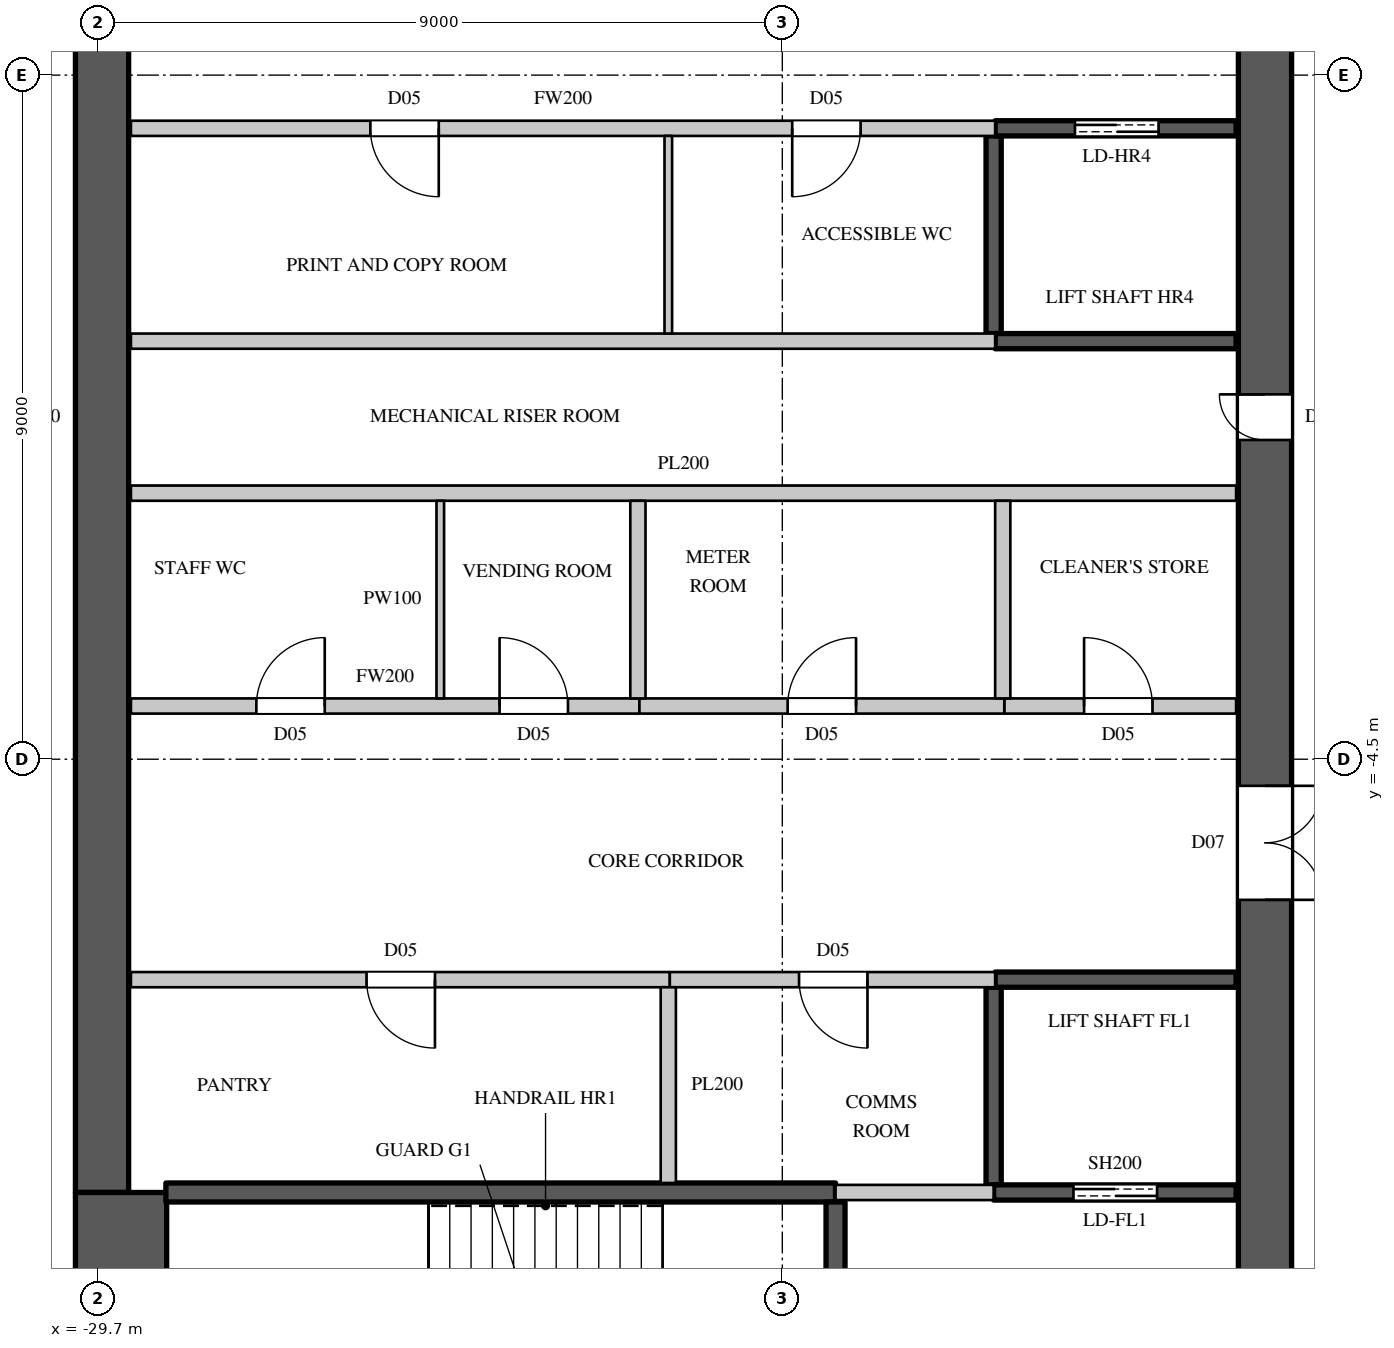
"""IFC4 building model, lengths in metres.
Left out: names, types, materials, properties, quantities, classifications, styles, units other than length and angle.
Written with IfcOpenShell. Run it as: python <this file> out.ifc"""

import sys

from ifc_helpers import new_model, si_unit, direction, frame, frame_2d, origin, place, context, subcontext, project, spatial, rectangle, extrude, element, fill, save


model = new_model("IFC4")
c1 = context("Model", 3, precision=1e-05, world=origin(), true_north=direction((0.0, 1.0)))
c2 = subcontext(c1, "Body", "Model", "MODEL_VIEW")
j1 = project(units=[si_unit("LENGTHUNIT", "METRE"), si_unit("PLANEANGLEUNIT", "RADIAN")], contexts=[c1])
p1 = place(None, origin())
s1 = spatial("IfcSite", under=j1, at=p1, CompositionType="ELEMENT")
p2 = place(p1, origin())
s2 = spatial("IfcBuilding", under=s1, at=p2, CompositionType="ELEMENT")
p3 = place(p2, frame((0.0, 0.0, 321.3)))
s3 = spatial("IfcBuildingStorey", under=s2, at=p3, CompositionType="ELEMENT", Elevation=321.3)
p4 = place(p3, frame((-14.35, -14.8, 0.0), z_axis=(0.0, 0.0, 1.0), x_axis=(0.0, 1.0, 0.0)))
e1 = element("IfcWall", 1, at=p4, inside=s3, PredefinedType="SHEAR", context=c2, shape_type="SweptSolid", body=[
    extrude(rectangle(XDim=29.6, YDim=0.7, at=frame_2d((14.8, 0.0))), origin(), (0.0, 0.0, 1.0), 4.1),
])
p5 = place(p4, frame((1.55, 0.0, 0.0)))
e2 = element("IfcOpeningElement", 2, at=p5, cuts=e1, PredefinedType="OPENING", context=c2, shape_type="SweptSolid", body=[
    extrude(rectangle(XDim=1.5, YDim=2.4, at=frame_2d((0.75, 1.2))), frame((0.0, 0.36, 0.0), z_axis=(0.0, -1.0, 0.0), x_axis=(1.0, 0.0, 0.0)), (0.0, 0.0, 1.0), 0.72),
])
p6 = place(p4, frame((26.55, 0.0, 0.0)))
e3 = element("IfcOpeningElement", 3, at=p6, cuts=e1, PredefinedType="OPENING", context=c2, shape_type="SweptSolid", body=[
    extrude(rectangle(XDim=1.5, YDim=2.4, at=frame_2d((0.75, 1.2))), frame((0.0, 0.36, 0.0), z_axis=(0.0, -1.0, 0.0), x_axis=(1.0, 0.0, 0.0)), (0.0, 0.0, 1.0), 0.72),
])
p7 = place(p4, frame((8.45, 0.0, 0.0)))
e4 = element("IfcOpeningElement", 4, at=p7, cuts=e1, PredefinedType="OPENING", context=c2, shape_type="SweptSolid", body=[
    extrude(rectangle(XDim=1.5, YDim=2.4, at=frame_2d((0.75, 1.2))), frame((0.0, 0.36, 0.0), z_axis=(0.0, -1.0, 0.0), x_axis=(1.0, 0.0, 0.0)), (0.0, 0.0, 1.0), 0.72),
])
p8 = place(p4, frame((19.65, 0.0, 0.0)))
e5 = element("IfcOpeningElement", 5, at=p8, cuts=e1, PredefinedType="OPENING", context=c2, shape_type="SweptSolid", body=[
    extrude(rectangle(XDim=1.5, YDim=2.4, at=frame_2d((0.75, 1.2))), frame((0.0, 0.36, 0.0), z_axis=(0.0, -1.0, 0.0), x_axis=(1.0, 0.0, 0.0)), (0.0, 0.0, 1.0), 0.72),
])
p9 = place(p4, frame((14.5, 0.0, 0.0)))
e6 = element("IfcOpeningElement", 6, at=p9, cuts=e1, PredefinedType="OPENING", context=c2, shape_type="SweptSolid", body=[
    extrude(rectangle(XDim=0.6, YDim=2.0, at=frame_2d((0.3, 1.0))), frame((0.0, 0.36, 0.0), z_axis=(0.0, -1.0, 0.0), x_axis=(1.0, 0.0, 0.0)), (0.0, 0.0, 1.0), 0.72),
])
p10 = place(p3, frame((-29.65, -10.2, 0.0), z_axis=(0.0, 0.0, 1.0), x_axis=(0.0, 1.0, 0.0)))
e7 = element("IfcWall", 7, at=p10, inside=s3, PredefinedType="SHEAR", context=c2, shape_type="SweptSolid", body=[
    extrude(rectangle(XDim=20.4, YDim=0.7, at=frame_2d((10.2, 0.0))), origin(), (0.0, 0.0, 1.0), 4.1),
])
p11 = place(p3, frame((-29.4, -14.8, 0.0), z_axis=(0.0, 0.0, 1.0), x_axis=(0.0, 1.0, 0.0)))
e8 = element("IfcWall", 8, at=p11, inside=s3, PredefinedType="SHEAR", context=c2, shape_type="SweptSolid", body=[
    extrude(rectangle(XDim=4.6, YDim=1.2, at=frame_2d((2.3, 0.0))), origin(), (0.0, 0.0, 1.0), 4.1),
])
p12 = place(p3, frame((-29.27, -7.4, 0.0), z_axis=(0.0, 0.0, 1.0), x_axis=(1.0, 0.0, 0.0)))
e9 = element("IfcWall", 9, at=p12, inside=s3, PredefinedType="PARTITIONING", context=c2, shape_type="SweptSolid", body=[
    extrude(rectangle(XDim=7.09, YDim=0.2, at=frame_2d((3.545, 0.0))), origin(), (0.0, 0.0, 1.0), 3.8),
])
p13 = place(p12, frame((3.1, 0.0, 0.0)))
e10 = element("IfcOpeningElement", 10, at=p13, cuts=e9, PredefinedType="OPENING", context=c2, shape_type="SweptSolid", body=[
    extrude(rectangle(XDim=0.9, YDim=2.2, at=frame_2d((0.45, 1.1))), frame((0.0, 0.11, 0.0), z_axis=(0.0, -1.0, 0.0), x_axis=(1.0, 0.0, 0.0)), (0.0, 0.0, 1.0), 0.22),
])
p14 = place(p3, frame((-29.27, -3.8, 0.0), z_axis=(0.0, 0.0, 1.0), x_axis=(1.0, 0.0, 0.0)))
e11 = element("IfcWall", 11, at=p14, inside=s3, PredefinedType="PARTITIONING", context=c2, shape_type="SweptSolid", body=[
    extrude(rectangle(XDim=6.69, YDim=0.2, at=frame_2d((3.345, 0.0))), origin(), (0.0, 0.0, 1.0), 3.8),
])
p15 = place(p14, frame((1.65, 0.0, 0.0)))
e12 = element("IfcOpeningElement", 12, at=p15, cuts=e11, PredefinedType="OPENING", context=c2, shape_type="SweptSolid", body=[
    extrude(rectangle(XDim=0.9, YDim=2.2, at=frame_2d((0.45, 1.1))), frame((0.0, 0.11, 0.0), z_axis=(0.0, -1.0, 0.0), x_axis=(1.0, 0.0, 0.0)), (0.0, 0.0, 1.0), 0.22),
])
p16 = place(p14, frame((4.85, 0.0, 0.0)))
e13 = element("IfcOpeningElement", 13, at=p16, cuts=e11, PredefinedType="OPENING", context=c2, shape_type="SweptSolid", body=[
    extrude(rectangle(XDim=0.9, YDim=2.2, at=frame_2d((0.45, 1.1))), frame((0.0, 0.11, 0.0), z_axis=(0.0, -1.0, 0.0), x_axis=(1.0, 0.0, 0.0)), (0.0, 0.0, 1.0), 0.22),
])
p17 = place(p3, frame((-29.27, 3.8, 0.0), z_axis=(0.0, 0.0, 1.0), x_axis=(1.0, 0.0, 0.0)))
e14 = element("IfcWall", 14, at=p17, inside=s3, PredefinedType="PARTITIONING", context=c2, shape_type="SweptSolid", body=[
    extrude(rectangle(XDim=11.37, YDim=0.2, at=frame_2d((5.685, 0.0))), origin(), (0.0, 0.0, 1.0), 3.8),
])
p18 = place(p17, frame((3.15, 0.0, 0.0)))
e15 = element("IfcOpeningElement", 15, at=p18, cuts=e14, PredefinedType="OPENING", context=c2, shape_type="SweptSolid", body=[
    extrude(rectangle(XDim=0.9, YDim=2.2, at=frame_2d((0.45, 1.1))), frame((0.0, 0.11, 0.0), z_axis=(0.0, -1.0, 0.0), x_axis=(1.0, 0.0, 0.0)), (0.0, 0.0, 1.0), 0.22),
])
p19 = place(p17, frame((8.7, 0.0, 0.0)))
e16 = element("IfcOpeningElement", 16, at=p19, cuts=e14, PredefinedType="OPENING", context=c2, shape_type="SweptSolid", body=[
    extrude(rectangle(XDim=0.9, YDim=2.2, at=frame_2d((0.45, 1.1))), frame((0.0, 0.11, 0.0), z_axis=(0.0, -1.0, 0.0), x_axis=(1.0, 0.0, 0.0)), (0.0, 0.0, 1.0), 0.22),
])
p20 = place(p3, frame((-17.78, -3.8, 0.0), z_axis=(0.0, 0.0, 1.0), x_axis=(1.0, 0.0, 0.0)))
e17 = element("IfcWall", 17, at=p20, inside=s3, PredefinedType="PARTITIONING", context=c2, shape_type="SweptSolid", body=[
    extrude(rectangle(XDim=3.05, YDim=0.2, at=frame_2d((1.525, 0.0))), origin(), (0.0, 0.0, 1.0), 3.8),
])
p21 = place(p20, frame((1.05, 0.0, 0.0)))
e18 = element("IfcOpeningElement", 18, at=p21, cuts=e17, PredefinedType="OPENING", context=c2, shape_type="SweptSolid", body=[
    extrude(rectangle(XDim=0.9, YDim=2.2, at=frame_2d((0.45, 1.1))), frame((0.0, 0.11, 0.0), z_axis=(0.0, -1.0, 0.0), x_axis=(1.0, 0.0, 0.0)), (0.0, 0.0, 1.0), 0.22),
])
p22 = place(p3, frame((-29.27, -1.0, 0.0), z_axis=(0.0, 0.0, 1.0), x_axis=(1.0, 0.0, 0.0)))
e19 = element("IfcWall", 19, at=p22, inside=s3, PredefinedType="PARTITIONING", context=c2, shape_type="SweptSolid", body=[
    extrude(rectangle(XDim=14.54, YDim=0.2, at=frame_2d((7.27, 0.0))), origin(), (0.0, 0.0, 1.0), 3.8),
])
p23 = place(p3, frame((-29.27, 1.0, 0.0), z_axis=(0.0, 0.0, 1.0), x_axis=(1.0, 0.0, 0.0)))
e20 = element("IfcWall", 20, at=p23, inside=s3, PredefinedType="PARTITIONING", context=c2, shape_type="SweptSolid", body=[
    extrude(rectangle(XDim=11.37, YDim=0.2, at=frame_2d((5.685, 0.0))), origin(), (0.0, 0.0, 1.0), 3.8),
])
p24 = place(p3, frame((-22.58, -3.8, 0.0), z_axis=(0.0, 0.0, 1.0), x_axis=(1.0, 0.0, 0.0)))
e21 = element("IfcWall", 21, at=p24, inside=s3, PredefinedType="PARTITIONING", context=c2, shape_type="SweptSolid", body=[
    extrude(rectangle(XDim=4.8, YDim=0.2, at=frame_2d((2.4, 0.0))), origin(), (0.0, 0.0, 1.0), 3.8),
])
p25 = place(p24, frame((1.95, 0.0, 0.0)))
e22 = element("IfcOpeningElement", 22, at=p25, cuts=e21, PredefinedType="OPENING", context=c2, shape_type="SweptSolid", body=[
    extrude(rectangle(XDim=0.9, YDim=2.2, at=frame_2d((0.45, 1.1))), frame((0.0, 0.11, 0.0), z_axis=(0.0, -1.0, 0.0), x_axis=(1.0, 0.0, 0.0)), (0.0, 0.0, 1.0), 0.22),
])
p26 = place(p3, frame((-22.6, -3.7, 0.0), z_axis=(0.0, 0.0, 1.0), x_axis=(0.0, 1.0, 0.0)))
e23 = element("IfcWall", 23, at=p26, inside=s3, PredefinedType="PARTITIONING", context=c2, shape_type="SweptSolid", body=[
    extrude(rectangle(XDim=2.6, YDim=0.2, at=frame_2d((1.3, 0.0))), origin(), (0.0, 0.0, 1.0), 3.8),
])
p27 = place(p3, frame((-22.18, -7.4, 0.0), z_axis=(0.0, 0.0, 1.0), x_axis=(1.0, 0.0, 0.0)))
e24 = element("IfcWall", 24, at=p27, inside=s3, PredefinedType="PARTITIONING", context=c2, shape_type="SweptSolid", body=[
    extrude(rectangle(XDim=4.28, YDim=0.2, at=frame_2d((2.14, 0.0))), origin(), (0.0, 0.0, 1.0), 3.8),
])
p28 = place(p27, frame((1.7, 0.0, 0.0)))
e25 = element("IfcOpeningElement", 25, at=p28, cuts=e24, PredefinedType="OPENING", context=c2, shape_type="SweptSolid", body=[
    extrude(rectangle(XDim=0.9, YDim=2.2, at=frame_2d((0.45, 1.1))), frame((0.0, 0.11, 0.0), z_axis=(0.0, -1.0, 0.0), x_axis=(1.0, 0.0, 0.0)), (0.0, 0.0, 1.0), 0.22),
])
p29 = place(p3, frame((-22.2, -10.075, 0.0), z_axis=(0.0, 0.0, 1.0), x_axis=(0.0, 1.0, 0.0)))
e26 = element("IfcWall", 26, at=p29, inside=s3, PredefinedType="PARTITIONING", context=c2, shape_type="SweptSolid", body=[
    extrude(rectangle(XDim=2.575, YDim=0.2, at=frame_2d((1.288, 0.0))), origin(), (0.0, 0.0, 1.0), 3.8),
])
p30 = place(p3, frame((-20.0, -10.2, 0.0), z_axis=(0.0, 0.0, 1.0), x_axis=(1.0, 0.0, 0.0)))
e27 = element("IfcWall", 27, at=p30, inside=s3, PredefinedType="PARTITIONING", context=c2, shape_type="SweptSolid", body=[
    extrude(rectangle(XDim=2.08, YDim=0.2, at=frame_2d((1.04, 0.0))), origin(), (0.0, 0.0, 1.0), 3.8),
])
p31 = place(p3, frame((-17.8, -3.7, 0.0), z_axis=(0.0, 0.0, 1.0), x_axis=(0.0, 1.0, 0.0)))
e28 = element("IfcWall", 28, at=p31, inside=s3, PredefinedType="PARTITIONING", context=c2, shape_type="SweptSolid", body=[
    extrude(rectangle(XDim=2.6, YDim=0.2, at=frame_2d((1.3, 0.0))), origin(), (0.0, 0.0, 1.0), 3.8),
])
p32 = place(p3, frame((-17.92, -10.1, 0.0), z_axis=(0.0, 0.0, 1.0), x_axis=(0.0, 1.0, 0.0)))
e29 = element("IfcWall", 29, at=p32, inside=s3, PredefinedType="SHEAR", context=c2, shape_type="SweptSolid", body=[
    extrude(rectangle(XDim=2.6, YDim=0.2, at=frame_2d((1.3, 0.0))), origin(), (0.0, 0.0, 1.0), 3.8),
])
p33 = place(p3, frame((-17.92, -10.2, 0.0), z_axis=(0.0, 0.0, 1.0), x_axis=(1.0, 0.0, 0.0)))
e30 = element("IfcWall", 30, at=p33, inside=s3, PredefinedType="SHEAR", context=c2, shape_type="SweptSolid", body=[
    extrude(rectangle(XDim=3.19, YDim=0.2, at=frame_2d((1.595, 0.0))), origin(), (0.0, 0.0, 1.0), 3.8),
])
p34 = place(p33, frame((1.05, 0.0, 0.0)))
e31 = element("IfcOpeningElement", 31, at=p34, cuts=e30, PredefinedType="OPENING", context=c2, shape_type="SweptSolid", body=[
    extrude(rectangle(XDim=1.1, YDim=2.2, at=frame_2d((0.55, 1.1))), frame((0.0, 0.11, 0.0), z_axis=(0.0, -1.0, 0.0), x_axis=(1.0, 0.0, 0.0)), (0.0, 0.0, 1.0), 0.22),
])
p35 = place(p3, frame((-17.9, -7.4, 0.0), z_axis=(0.0, 0.0, 1.0), x_axis=(1.0, 0.0, 0.0)))
e32 = element("IfcWall", 32, at=p35, inside=s3, PredefinedType="SHEAR", context=c2, shape_type="SweptSolid", body=[
    extrude(rectangle(XDim=3.17, YDim=0.2, at=frame_2d((1.585, 0.0))), origin(), (0.0, 0.0, 1.0), 3.8),
])
p36 = place(p3, frame((-17.92, 1.1, 0.0), z_axis=(0.0, 0.0, 1.0), x_axis=(0.0, 1.0, 0.0)))
e33 = element("IfcWall", 33, at=p36, inside=s3, PredefinedType="SHEAR", context=c2, shape_type="SweptSolid", body=[
    extrude(rectangle(XDim=2.6, YDim=0.2, at=frame_2d((1.3, 0.0))), origin(), (0.0, 0.0, 1.0), 3.8),
])
p37 = place(p3, frame((-17.9, 1.0, 0.0), z_axis=(0.0, 0.0, 1.0), x_axis=(1.0, 0.0, 0.0)))
e34 = element("IfcWall", 34, at=p37, inside=s3, PredefinedType="SHEAR", context=c2, shape_type="SweptSolid", body=[
    extrude(rectangle(XDim=3.17, YDim=0.2, at=frame_2d((1.585, 0.0))), origin(), (0.0, 0.0, 1.0), 3.8),
])
p38 = place(p3, frame((-17.9, 3.8, 0.0), z_axis=(0.0, 0.0, 1.0), x_axis=(1.0, 0.0, 0.0)))
e35 = element("IfcWall", 35, at=p38, inside=s3, PredefinedType="SHEAR", context=c2, shape_type="SweptSolid", body=[
    extrude(rectangle(XDim=3.17, YDim=0.2, at=frame_2d((1.585, 0.0))), origin(), (0.0, 0.0, 1.0), 3.8),
])
p39 = place(p38, frame((1.05, 0.0, 0.0)))
e36 = element("IfcOpeningElement", 36, at=p39, cuts=e35, PredefinedType="OPENING", context=c2, shape_type="SweptSolid", body=[
    extrude(rectangle(XDim=1.1, YDim=2.2, at=frame_2d((0.55, 1.1))), frame((0.0, 0.11, 0.0), z_axis=(0.0, -1.0, 0.0), x_axis=(1.0, 0.0, 0.0)), (0.0, 0.0, 1.0), 0.22),
])
p40 = place(p3, frame((-28.81, -10.2, 0.0), z_axis=(0.0, 0.0, 1.0), x_axis=(1.0, 0.0, 0.0)))
e37 = element("IfcWall", 37, at=p40, inside=s3, PredefinedType="SHEAR", context=c2, shape_type="SweptSolid", body=[
    extrude(rectangle(XDim=8.81, YDim=0.25, at=frame_2d((4.405, 0.0))), origin(), (0.0, 0.0, 1.0), 3.8),
])
p41 = place(p3, frame((-20.0, -14.77, 0.0), z_axis=(0.0, 0.0, 1.0), x_axis=(0.0, 1.0, 0.0)))
e38 = element("IfcWall", 38, at=p41, inside=s3, PredefinedType="SHEAR", context=c2, shape_type="SweptSolid", body=[
    extrude(rectangle(XDim=4.445, YDim=0.25, at=frame_2d((2.223, 0.0))), origin(), (0.0, 0.0, 1.0), 3.8),
])
p42 = place(p41, frame((1.7, 0.0, 0.0)))
e39 = element("IfcOpeningElement", 39, at=p42, cuts=e38, PredefinedType="OPENING", context=c2, shape_type="SweptSolid", body=[
    extrude(rectangle(XDim=1.1, YDim=2.2, at=frame_2d((0.55, 1.1))), frame((0.0, 0.135, 0.0), z_axis=(0.0, -1.0, 0.0), x_axis=(1.0, 0.0, 0.0)), (0.0, 0.0, 1.0), 0.27),
])
for number, where, z_axis, x_axis in (
    (40, (-25.2, -3.7, 0.0), (0.0, 0.0, 1.0), (0.0, 1.0, 0.0)),
    (41, (-22.2, 1.1, 0.0), (0.0, 0.0, 1.0), (0.0, 1.0, 0.0)),
):
    element("IfcWall", number, at=place(p3, frame(where, z_axis=z_axis, x_axis=x_axis)), inside=s3, PredefinedType="PARTITIONING", context=c2, shape_type="SweptSolid", body=[
        extrude(rectangle(XDim=2.6, YDim=0.1, at=frame_2d((1.3, 0.0))), origin(), (0.0, 0.0, 1.0), 3.8),
    ])
p43 = place(p13, origin())
e42 = element("IfcDoor", 42, at=p43, inside=s3, OperationType="SINGLE_SWING_LEFT", PredefinedType="DOOR", context=c2, shape_type="SweptSolid", body=[
    extrude(rectangle(XDim=0.9, YDim=2.2, at=frame_2d((0.45, 1.1))), frame((0.0, 0.025, 0.0), z_axis=(0.0, -1.0, 0.0), x_axis=(1.0, 0.0, 0.0)), (0.0, 0.0, 1.0), 0.05),
])
fill(e10, e42)
p44 = place(p28, origin())
e43 = element("IfcDoor", 43, at=p44, inside=s3, OperationType="SINGLE_SWING_LEFT", PredefinedType="DOOR", context=c2, shape_type="SweptSolid", body=[
    extrude(rectangle(XDim=0.9, YDim=2.2, at=frame_2d((0.45, 1.1))), frame((0.0, 0.025, 0.0), z_axis=(0.0, -1.0, 0.0), x_axis=(1.0, 0.0, 0.0)), (0.0, 0.0, 1.0), 0.05),
])
fill(e25, e43)
p45 = place(p15, origin())
e44 = element("IfcDoor", 44, at=p45, inside=s3, OperationType="SINGLE_SWING_RIGHT", PredefinedType="DOOR", context=c2, shape_type="SweptSolid", body=[
    extrude(rectangle(XDim=0.9, YDim=2.2, at=frame_2d((0.45, 1.1))), frame((0.0, 0.025, 0.0), z_axis=(0.0, -1.0, 0.0), x_axis=(1.0, 0.0, 0.0)), (0.0, 0.0, 1.0), 0.05),
])
fill(e12, e44)
p46 = place(p16, origin())
e45 = element("IfcDoor", 45, at=p46, inside=s3, OperationType="SINGLE_SWING_LEFT", PredefinedType="DOOR", context=c2, shape_type="SweptSolid", body=[
    extrude(rectangle(XDim=0.9, YDim=2.2, at=frame_2d((0.45, 1.1))), frame((0.0, 0.025, 0.0), z_axis=(0.0, -1.0, 0.0), x_axis=(1.0, 0.0, 0.0)), (0.0, 0.0, 1.0), 0.05),
])
fill(e13, e45)
p47 = place(p25, origin())
e46 = element("IfcDoor", 46, at=p47, inside=s3, OperationType="SINGLE_SWING_RIGHT", PredefinedType="DOOR", context=c2, shape_type="SweptSolid", body=[
    extrude(rectangle(XDim=0.9, YDim=2.2, at=frame_2d((0.45, 1.1))), frame((0.0, 0.025, 0.0), z_axis=(0.0, -1.0, 0.0), x_axis=(1.0, 0.0, 0.0)), (0.0, 0.0, 1.0), 0.05),
])
fill(e22, e46)
p48 = place(p21, origin())
e47 = element("IfcDoor", 47, at=p48, inside=s3, OperationType="SINGLE_SWING_LEFT", PredefinedType="DOOR", context=c2, shape_type="SweptSolid", body=[
    extrude(rectangle(XDim=0.9, YDim=2.2, at=frame_2d((0.45, 1.1))), frame((0.0, 0.025, 0.0), z_axis=(0.0, -1.0, 0.0), x_axis=(1.0, 0.0, 0.0)), (0.0, 0.0, 1.0), 0.05),
])
fill(e18, e47)
p49 = place(p18, origin())
e48 = element("IfcDoor", 48, at=p49, inside=s3, OperationType="SINGLE_SWING_LEFT", PredefinedType="DOOR", context=c2, shape_type="SweptSolid", body=[
    extrude(rectangle(XDim=0.9, YDim=2.2, at=frame_2d((0.45, 1.1))), frame((0.0, 0.025, 0.0), z_axis=(0.0, -1.0, 0.0), x_axis=(1.0, 0.0, 0.0)), (0.0, 0.0, 1.0), 0.05),
])
fill(e15, e48)
p50 = place(p19, origin())
e49 = element("IfcDoor", 49, at=p50, inside=s3, OperationType="SINGLE_SWING_RIGHT", PredefinedType="DOOR", context=c2, shape_type="SweptSolid", body=[
    extrude(rectangle(XDim=0.9, YDim=2.2, at=frame_2d((0.45, 1.1))), frame((0.0, 0.025, 0.0), z_axis=(0.0, -1.0, 0.0), x_axis=(1.0, 0.0, 0.0)), (0.0, 0.0, 1.0), 0.05),
])
fill(e16, e49)
p51 = place(p34, origin())
e50 = element("IfcDoor", 50, at=p51, inside=s3, OperationType="DOUBLE_DOOR_SLIDING", PredefinedType="DOOR", context=c2, shape_type="SweptSolid", body=[
    extrude(rectangle(XDim=1.1, YDim=2.2, at=frame_2d((0.55, 1.1))), frame((0.0, 0.025, 0.0), z_axis=(0.0, -1.0, 0.0), x_axis=(1.0, 0.0, 0.0)), (0.0, 0.0, 1.0), 0.05),
])
fill(e31, e50)
p52 = place(p39, origin())
e51 = element("IfcDoor", 51, at=p52, inside=s3, OperationType="DOUBLE_DOOR_SLIDING", PredefinedType="DOOR", context=c2, shape_type="SweptSolid", body=[
    extrude(rectangle(XDim=1.1, YDim=2.2, at=frame_2d((0.55, 1.1))), frame((0.0, 0.025, 0.0), z_axis=(0.0, -1.0, 0.0), x_axis=(1.0, 0.0, 0.0)), (0.0, 0.0, 1.0), 0.05),
])
fill(e36, e51)
p53 = place(p7, origin())
e52 = element("IfcDoor", 52, at=p53, inside=s3, OperationType="DOUBLE_DOOR_SINGLE_SWING", PredefinedType="DOOR", context=c2, shape_type="SweptSolid", body=[
    extrude(rectangle(XDim=1.5, YDim=2.4, at=frame_2d((0.75, 1.2))), frame((0.0, -0.295, 0.0), z_axis=(0.0, -1.0, 0.0), x_axis=(1.0, 0.0, 0.0)), (0.0, 0.0, 1.0), 0.05),
])
fill(e4, e52)
p54 = place(p9, origin())
e53 = element("IfcDoor", 53, at=p54, inside=s3, OperationType="SINGLE_SWING_RIGHT", PredefinedType="DOOR", context=c2, shape_type="SweptSolid", body=[
    extrude(rectangle(XDim=0.6, YDim=2.0, at=frame_2d((0.3, 1.0))), frame((0.0, 0.345, 0.0), z_axis=(0.0, -1.0, 0.0), x_axis=(1.0, 0.0, 0.0)), (0.0, 0.0, 1.0), 0.05),
])
fill(e6, e53)
save(model, sys.argv[1])
